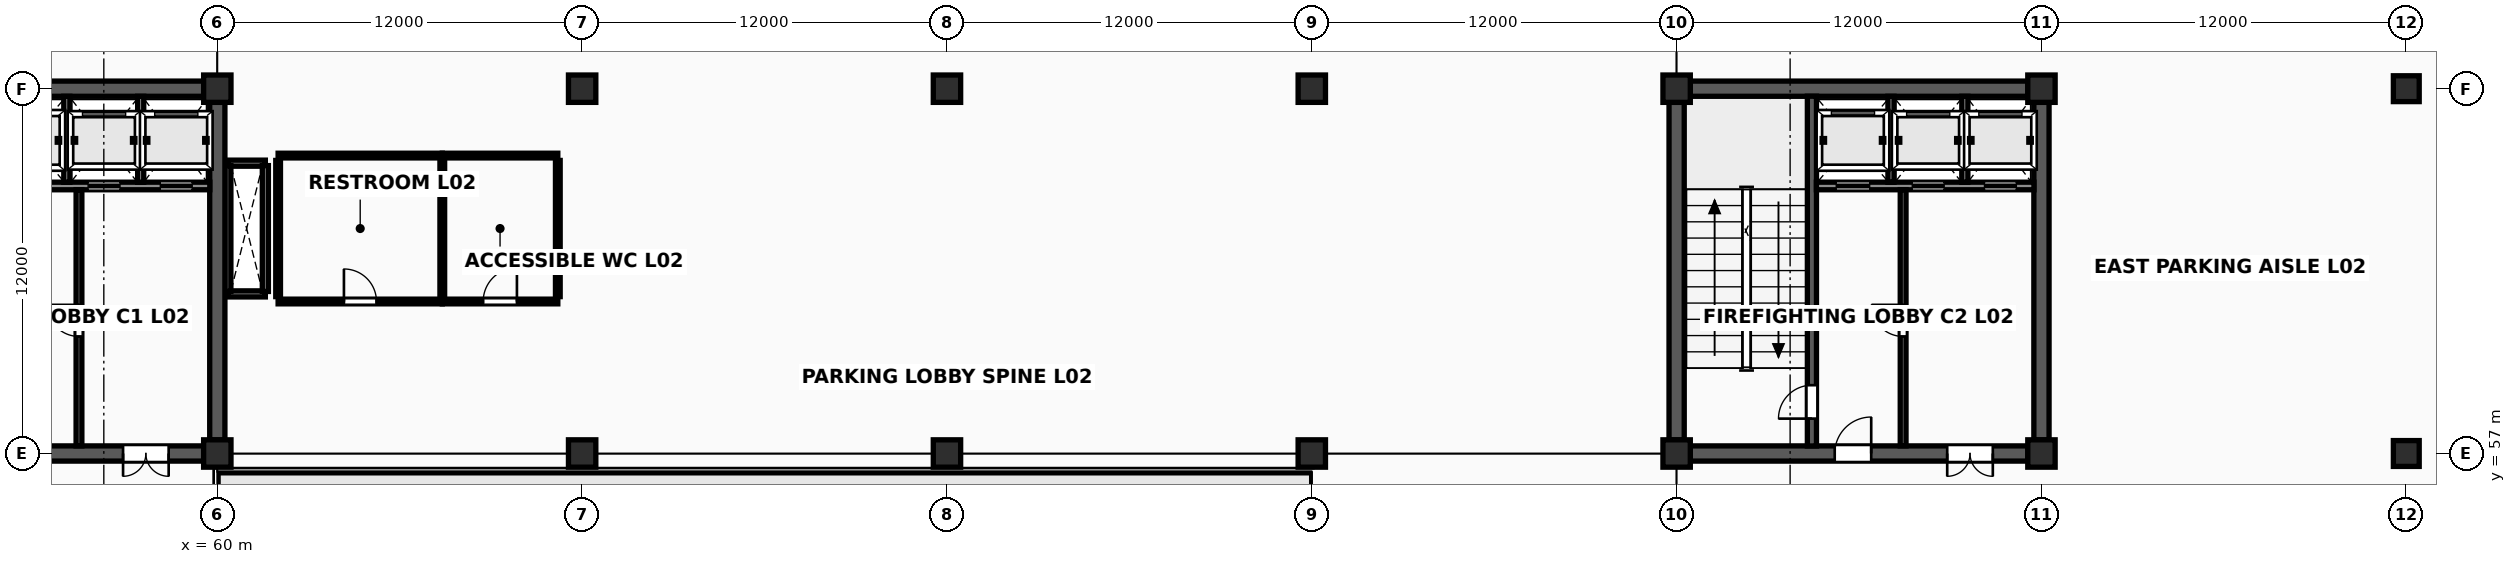
"""IFC4 building model, lengths in metres.
Left out: names, types, materials, properties, quantities, classifications, styles, units other than length and angle.
Written with IfcOpenShell. Run it as: python <this file> out.ifc"""

import sys

from ifc_helpers import new_model, si_unit, direction, frame, frame_2d, origin, origin_2d, place, context, subcontext, project, spatial, rectangle, extrude, element, fill, save


model = new_model("IFC4")
c1 = context("Model", 3, precision=1e-05, world=origin(), true_north=direction((0.0, 1.0)))
c2 = subcontext(c1, "Body", "Model", "MODEL_VIEW")
j1 = project(units=[si_unit("LENGTHUNIT", "METRE"), si_unit("PLANEANGLEUNIT", "RADIAN")], contexts=[c1])
p1 = place(None, origin())
s1 = spatial("IfcSite", under=j1, at=p1, CompositionType="ELEMENT")
p2 = place(p1, origin())
s2 = spatial("IfcBuilding", under=s1, at=p2, CompositionType="ELEMENT")
p3 = place(p2, frame((0.0, 0.0, 9.6)))
s3 = spatial("IfcBuildingStorey", under=s2, at=p3, CompositionType="ELEMENT", Elevation=9.6)
for number, where, z_axis, x_axis in (
    (1, (60.0, 57.0, 0.0), (0.0, 0.0, 1.0), (1.0, 0.0, 0.0)),
    (2, (60.0, 69.0, 0.0), (0.0, 0.0, 1.0), (1.0, 0.0, 0.0)),
    (3, (72.0, 57.0, 0.0), (0.0, 0.0, 1.0), (1.0, 0.0, 0.0)),
    (4, (72.0, 69.0, 0.0), (0.0, 0.0, 1.0), (1.0, 0.0, 0.0)),
    (5, (84.0, 57.0, 0.0), (0.0, 0.0, 1.0), (1.0, 0.0, 0.0)),
    (6, (84.0, 69.0, 0.0), (0.0, 0.0, 1.0), (1.0, 0.0, 0.0)),
    (7, (96.0, 57.0, 0.0), (0.0, 0.0, 1.0), (1.0, 0.0, 0.0)),
    (8, (96.0, 69.0, 0.0), (0.0, 0.0, 1.0), (1.0, 0.0, 0.0)),
    (9, (108.0, 57.0, 0.0), (0.0, 0.0, 1.0), (1.0, 0.0, 0.0)),
    (10, (108.0, 69.0, 0.0), (0.0, 0.0, 1.0), (1.0, 0.0, 0.0)),
    (11, (120.0, 57.0, 0.0), (0.0, 0.0, 1.0), (1.0, 0.0, 0.0)),
    (12, (120.0, 69.0, 0.0), (0.0, 0.0, 1.0), (1.0, 0.0, 0.0)),
):
    element("IfcColumn", number, at=place(p3, frame(where, z_axis=z_axis, x_axis=x_axis)), inside=s3, PredefinedType="COLUMN", context=c2, shape_type="SweptSolid", body=[
        extrude(rectangle(XDim=0.9, YDim=0.9, at=origin_2d()), origin(), (0.0, 0.0, 1.0), 3.8),
    ])
for number, where, z_axis, x_axis in (
    (13, (132.0, 57.0, 0.0), (0.0, 0.0, 1.0), (1.0, 0.0, 0.0)),
    (14, (132.0, 69.0, 0.0), (0.0, 0.0, 1.0), (1.0, 0.0, 0.0)),
):
    element("IfcColumn", number, at=place(p3, frame(where, z_axis=z_axis, x_axis=x_axis)), inside=s3, PredefinedType="COLUMN", context=c2, shape_type="SweptSolid", body=[
        extrude(rectangle(XDim=0.85, YDim=0.85, at=origin_2d()), origin(), (0.0, 0.0, 1.0), 3.8),
    ])
for number, where, z_axis, x_axis in (
    (15, (60.347, 62.25, 0.0), (0.0, 0.0, 1.0), (1.0, 0.0, 0.0)),
    (16, (60.347, 66.55, 0.0), (0.0, 0.0, 1.0), (1.0, 0.0, 0.0)),
):
    element("IfcWall", number, at=place(p3, frame(where, z_axis=z_axis, x_axis=x_axis)), inside=s3, PredefinedType="SOLIDWALL", context=c2, shape_type="SweptSolid", body=[
        extrude(rectangle(XDim=1.233, YDim=0.2, at=frame_2d((0.617, 0.0))), origin(), (0.0, 0.0, 1.0), 3.638),
    ])
for number, where, z_axis, x_axis in (
    (17, (60.347, 62.33, 0.0), (0.0, 0.0, 1.0), (0.0, 1.0, 0.0)),
    (18, (61.58, 62.33, 0.0), (0.0, 0.0, 1.0), (0.0, 1.0, 0.0)),
):
    element("IfcWall", number, at=place(p3, frame(where, z_axis=z_axis, x_axis=x_axis)), inside=s3, PredefinedType="SOLIDWALL", context=c2, shape_type="SweptSolid", body=[
        extrude(rectangle(XDim=4.14, YDim=0.2, at=frame_2d((2.07, 0.0))), origin(), (0.0, 0.0, 1.0), 3.638),
    ])
p4 = place(p3, frame((48.447, 57.0, 0.0), z_axis=(0.0, 0.0, 1.0), x_axis=(1.0, 0.0, 0.0)))
e19 = element("IfcWall", 19, at=p4, inside=s3, PredefinedType="SHEAR", context=c2, shape_type="SweptSolid", body=[
    extrude(rectangle(XDim=11.106, YDim=0.5, at=frame_2d((5.553, 0.0))), origin(), (0.0, 0.0, 1.0), 3.638),
])
p5 = place(p4, frame((4.753, 0.0, 0.0)))
e20 = element("IfcOpeningElement", 20, at=p5, cuts=e19, PredefinedType="OPENING", context=c2, shape_type="SweptSolid", body=[
    extrude(rectangle(XDim=1.2, YDim=2.2, at=frame_2d((0.6, 1.1))), frame((0.0, 0.265, 0.0), z_axis=(0.0, -1.0, 0.0), x_axis=(1.0, 0.0, 0.0)), (0.0, 0.0, 1.0), 0.53),
])
p6 = place(p4, frame((8.453, 0.0, 0.0)))
e21 = element("IfcOpeningElement", 21, at=p6, cuts=e19, PredefinedType="OPENING", context=c2, shape_type="SweptSolid", body=[
    extrude(rectangle(XDim=1.5, YDim=2.25, at=frame_2d((0.75, 1.125))), frame((0.0, 0.265, 0.0), z_axis=(0.0, -1.0, 0.0), x_axis=(1.0, 0.0, 0.0)), (0.0, 0.0, 1.0), 0.53),
])
for number, where, z_axis, x_axis in (
    (22, (48.447, 69.0, 0.0), (0.0, 0.0, 1.0), (1.0, 0.0, 0.0)),
    (23, (60.0, 57.447, 0.0), (0.0, 0.0, 1.0), (0.0, 1.0, 0.0)),
):
    element("IfcWall", number, at=place(p3, frame(where, z_axis=z_axis, x_axis=x_axis)), inside=s3, PredefinedType="SHEAR", context=c2, shape_type="SweptSolid", body=[
        extrude(rectangle(XDim=11.106, YDim=0.5, at=frame_2d((5.553, 0.0))), origin(), (0.0, 0.0, 1.0), 3.638),
    ])
p7 = place(p3, frame((52.597, 65.8, 0.0), z_axis=(0.0, 0.0, 1.0), x_axis=(1.0, 0.0, 0.0)))
e24 = element("IfcWall", 24, at=p7, inside=s3, PredefinedType="SOLIDWALL", context=c2, shape_type="SweptSolid", body=[
    extrude(rectangle(XDim=7.156, YDim=0.25, at=frame_2d((3.578, 0.0))), origin(), (0.0, 0.0, 1.0), 3.638),
])
p8 = place(p7, frame((0.653, 0.0, 0.0)))
e25 = element("IfcOpeningElement", 25, at=p8, cuts=e24, PredefinedType="OPENING", context=c2, shape_type="SweptSolid", body=[
    extrude(rectangle(XDim=1.1, YDim=2.24, at=frame_2d((0.55, 1.12))), frame((0.0, 0.14, 0.0), z_axis=(0.0, -1.0, 0.0), x_axis=(1.0, 0.0, 0.0)), (0.0, 0.0, 1.0), 0.28),
])
p9 = place(p7, frame((3.153, 0.0, 0.0)))
e26 = element("IfcOpeningElement", 26, at=p9, cuts=e24, PredefinedType="OPENING", context=c2, shape_type="SweptSolid", body=[
    extrude(rectangle(XDim=1.05, YDim=2.2, at=frame_2d((0.525, 1.1))), frame((0.0, 0.14, 0.0), z_axis=(0.0, -1.0, 0.0), x_axis=(1.0, 0.0, 0.0)), (0.0, 0.0, 1.0), 0.28),
])
p10 = place(p7, frame((5.528, 0.0, 0.0)))
e27 = element("IfcOpeningElement", 27, at=p10, cuts=e24, PredefinedType="OPENING", context=c2, shape_type="SweptSolid", body=[
    extrude(rectangle(XDim=1.05, YDim=2.2, at=frame_2d((0.525, 1.1))), frame((0.0, 0.14, 0.0), z_axis=(0.0, -1.0, 0.0), x_axis=(1.0, 0.0, 0.0)), (0.0, 0.0, 1.0), 0.28),
])
for number, where, z_axis, x_axis in (
    (28, (55.05, 65.92, 0.0), (0.0, 0.0, 1.0), (0.0, 1.0, 0.0)),
    (29, (57.48, 65.92, 0.0), (0.0, 0.0, 1.0), (0.0, 1.0, 0.0)),
):
    element("IfcWall", number, at=place(p3, frame(where, z_axis=z_axis, x_axis=x_axis)), inside=s3, PredefinedType="SOLIDWALL", context=c2, shape_type="SweptSolid", body=[
        extrude(rectangle(XDim=2.83, YDim=0.2, at=frame_2d((1.415, 0.0))), origin(), (0.0, 0.0, 1.0), 3.628),
    ])
p11 = place(p3, frame((55.45, 57.25, 0.0), z_axis=(0.0, 0.0, 1.0), x_axis=(0.0, 1.0, 0.0)))
e30 = element("IfcWall", 30, at=p11, inside=s3, PredefinedType="SOLIDWALL", context=c2, shape_type="SweptSolid", body=[
    extrude(rectangle(XDim=8.43, YDim=0.19, at=frame_2d((4.215, 0.0))), origin(), (0.0, 0.0, 1.0), 3.628),
])
p12 = place(p11, frame((3.6, 0.0, 0.0)))
e31 = element("IfcOpeningElement", 31, at=p12, cuts=e30, PredefinedType="OPENING", context=c2, shape_type="SweptSolid", body=[
    extrude(rectangle(XDim=1.04, YDim=2.18, at=frame_2d((0.52, 1.09))), frame((0.0, 0.11, 0.0), z_axis=(0.0, -1.0, 0.0), x_axis=(1.0, 0.0, 0.0)), (0.0, 0.0, 1.0), 0.22),
])
p13 = place(p3, frame((108.447, 57.0, 0.0), z_axis=(0.0, 0.0, 1.0), x_axis=(1.0, 0.0, 0.0)))
e32 = element("IfcWall", 32, at=p13, inside=s3, PredefinedType="SHEAR", context=c2, shape_type="SweptSolid", body=[
    extrude(rectangle(XDim=11.106, YDim=0.5, at=frame_2d((5.553, 0.0))), origin(), (0.0, 0.0, 1.0), 3.638),
])
p14 = place(p13, frame((4.753, 0.0, 0.0)))
e33 = element("IfcOpeningElement", 33, at=p14, cuts=e32, PredefinedType="OPENING", context=c2, shape_type="SweptSolid", body=[
    extrude(rectangle(XDim=1.2, YDim=2.2, at=frame_2d((0.6, 1.1))), frame((0.0, 0.265, 0.0), z_axis=(0.0, -1.0, 0.0), x_axis=(1.0, 0.0, 0.0)), (0.0, 0.0, 1.0), 0.53),
])
p15 = place(p13, frame((8.453, 0.0, 0.0)))
e34 = element("IfcOpeningElement", 34, at=p15, cuts=e32, PredefinedType="OPENING", context=c2, shape_type="SweptSolid", body=[
    extrude(rectangle(XDim=1.5, YDim=2.25, at=frame_2d((0.75, 1.125))), frame((0.0, 0.265, 0.0), z_axis=(0.0, -1.0, 0.0), x_axis=(1.0, 0.0, 0.0)), (0.0, 0.0, 1.0), 0.53),
])
for number, where, z_axis, x_axis in (
    (35, (108.447, 69.0, 0.0), (0.0, 0.0, 1.0), (1.0, 0.0, 0.0)),
    (36, (108.0, 57.447, 0.0), (0.0, 0.0, 1.0), (0.0, 1.0, 0.0)),
    (37, (120.0, 57.447, 0.0), (0.0, 0.0, 1.0), (0.0, 1.0, 0.0)),
):
    element("IfcWall", number, at=place(p3, frame(where, z_axis=z_axis, x_axis=x_axis)), inside=s3, PredefinedType="SHEAR", context=c2, shape_type="SweptSolid", body=[
        extrude(rectangle(XDim=11.106, YDim=0.5, at=frame_2d((5.553, 0.0))), origin(), (0.0, 0.0, 1.0), 3.638),
    ])
p16 = place(p3, frame((112.45, 57.247, 0.0), z_axis=(0.0, 0.0, 1.0), x_axis=(0.0, 1.0, 0.0)))
e38 = element("IfcWall", 38, at=p16, inside=s3, PredefinedType="SHEAR", context=c2, shape_type="SweptSolid", body=[
    extrude(rectangle(XDim=11.506, YDim=0.3, at=frame_2d((5.753, 0.0))), origin(), (0.0, 0.0, 1.0), 3.638),
])
p17 = place(p16, frame((0.9, 0.0, 0.0)))
e39 = element("IfcOpeningElement", 39, at=p17, cuts=e38, PredefinedType="OPENING", context=c2, shape_type="SweptSolid", body=[
    extrude(rectangle(XDim=1.1, YDim=2.2, at=frame_2d((0.55, 1.1))), frame((0.0, 0.165, 0.0), z_axis=(0.0, -1.0, 0.0), x_axis=(1.0, 0.0, 0.0)), (0.0, 0.0, 1.0), 0.33),
])
p18 = place(p3, frame((112.597, 65.8, 0.0), z_axis=(0.0, 0.0, 1.0), x_axis=(1.0, 0.0, 0.0)))
e40 = element("IfcWall", 40, at=p18, inside=s3, PredefinedType="SOLIDWALL", context=c2, shape_type="SweptSolid", body=[
    extrude(rectangle(XDim=7.156, YDim=0.25, at=frame_2d((3.578, 0.0))), origin(), (0.0, 0.0, 1.0), 3.638),
])
p19 = place(p18, frame((0.653, 0.0, 0.0)))
e41 = element("IfcOpeningElement", 41, at=p19, cuts=e40, PredefinedType="OPENING", context=c2, shape_type="SweptSolid", body=[
    extrude(rectangle(XDim=1.1, YDim=2.24, at=frame_2d((0.55, 1.12))), frame((0.0, 0.14, 0.0), z_axis=(0.0, -1.0, 0.0), x_axis=(1.0, 0.0, 0.0)), (0.0, 0.0, 1.0), 0.28),
])
p20 = place(p18, frame((3.153, 0.0, 0.0)))
e42 = element("IfcOpeningElement", 42, at=p20, cuts=e40, PredefinedType="OPENING", context=c2, shape_type="SweptSolid", body=[
    extrude(rectangle(XDim=1.05, YDim=2.2, at=frame_2d((0.525, 1.1))), frame((0.0, 0.14, 0.0), z_axis=(0.0, -1.0, 0.0), x_axis=(1.0, 0.0, 0.0)), (0.0, 0.0, 1.0), 0.28),
])
p21 = place(p18, frame((5.528, 0.0, 0.0)))
e43 = element("IfcOpeningElement", 43, at=p21, cuts=e40, PredefinedType="OPENING", context=c2, shape_type="SweptSolid", body=[
    extrude(rectangle(XDim=1.05, YDim=2.2, at=frame_2d((0.525, 1.1))), frame((0.0, 0.14, 0.0), z_axis=(0.0, -1.0, 0.0), x_axis=(1.0, 0.0, 0.0)), (0.0, 0.0, 1.0), 0.28),
])
for number, where, z_axis, x_axis in (
    (44, (115.05, 65.92, 0.0), (0.0, 0.0, 1.0), (0.0, 1.0, 0.0)),
    (45, (117.48, 65.92, 0.0), (0.0, 0.0, 1.0), (0.0, 1.0, 0.0)),
):
    element("IfcWall", number, at=place(p3, frame(where, z_axis=z_axis, x_axis=x_axis)), inside=s3, PredefinedType="SOLIDWALL", context=c2, shape_type="SweptSolid", body=[
        extrude(rectangle(XDim=2.83, YDim=0.2, at=frame_2d((1.415, 0.0))), origin(), (0.0, 0.0, 1.0), 3.628),
    ])
p22 = place(p3, frame((115.45, 57.25, 0.0), z_axis=(0.0, 0.0, 1.0), x_axis=(0.0, 1.0, 0.0)))
e46 = element("IfcWall", 46, at=p22, inside=s3, PredefinedType="SOLIDWALL", context=c2, shape_type="SweptSolid", body=[
    extrude(rectangle(XDim=8.43, YDim=0.19, at=frame_2d((4.215, 0.0))), origin(), (0.0, 0.0, 1.0), 3.628),
])
p23 = place(p22, frame((3.6, 0.0, 0.0)))
e47 = element("IfcOpeningElement", 47, at=p23, cuts=e46, PredefinedType="OPENING", context=c2, shape_type="SweptSolid", body=[
    extrude(rectangle(XDim=1.04, YDim=2.18, at=frame_2d((0.52, 1.09))), frame((0.0, 0.11, 0.0), z_axis=(0.0, -1.0, 0.0), x_axis=(1.0, 0.0, 0.0)), (0.0, 0.0, 1.0), 0.22),
])
p24 = place(p3, frame((62.0, 62.0, 0.0), z_axis=(0.0, 0.0, 1.0), x_axis=(1.0, 0.0, 0.0)))
e48 = element("IfcWall", 48, at=p24, inside=s3, PredefinedType="PLUMBINGWALL", context=c2, shape_type="SweptSolid", body=[
    extrude(rectangle(XDim=5.4, YDim=0.155, at=frame_2d((2.7, 0.0))), origin(), (0.0, 0.0, 1.0), 2.75),
])
p25 = place(p24, frame((2.165, 0.0, 0.0)))
e49 = element("IfcOpeningElement", 49, at=p25, cuts=e48, PredefinedType="OPENING", context=c2, shape_type="SweptSolid", body=[
    extrude(rectangle(XDim=1.07, YDim=2.19, at=frame_2d((0.535, 1.095))), frame((0.0, 0.093, 0.0), z_axis=(0.0, -1.0, 0.0), x_axis=(1.0, 0.0, 0.0)), (0.0, 0.0, 1.0), 0.185),
])
p26 = place(p3, frame((62.0, 66.8, 0.0), z_axis=(0.0, 0.0, 1.0), x_axis=(1.0, 0.0, 0.0)))
e50 = element("IfcWall", 50, at=p26, inside=s3, PredefinedType="PLUMBINGWALL", context=c2, shape_type="SweptSolid", body=[
    extrude(rectangle(XDim=5.4, YDim=0.155, at=frame_2d((2.7, 0.0))), origin(), (0.0, 0.0, 1.0), 2.75),
])
for number, where, z_axis, x_axis in (
    (51, (62.0, 62.16, 0.0), (0.0, 0.0, 1.0), (0.0, 1.0, 0.0)),
    (52, (67.4, 62.16, 0.0), (0.0, 0.0, 1.0), (0.0, 1.0, 0.0)),
):
    element("IfcWall", number, at=place(p3, frame(where, z_axis=z_axis, x_axis=x_axis)), inside=s3, PredefinedType="PLUMBINGWALL", context=c2, shape_type="SweptSolid", body=[
        extrude(rectangle(XDim=4.48, YDim=0.155, at=frame_2d((2.24, 0.0))), origin(), (0.0, 0.0, 1.0), 2.75),
    ])
p27 = place(p3, frame((67.4, 62.0, 0.0), z_axis=(0.0, 0.0, 1.0), x_axis=(1.0, 0.0, 0.0)))
e53 = element("IfcWall", 53, at=p27, inside=s3, PredefinedType="PLUMBINGWALL", context=c2, shape_type="SweptSolid", body=[
    extrude(rectangle(XDim=3.8, YDim=0.155, at=frame_2d((1.9, 0.0))), origin(), (0.0, 0.0, 1.0), 2.75),
])
p28 = place(p27, frame((1.345, 0.0, 0.0)))
e54 = element("IfcOpeningElement", 54, at=p28, cuts=e53, PredefinedType="OPENING", context=c2, shape_type="SweptSolid", body=[
    extrude(rectangle(XDim=1.11, YDim=2.21, at=frame_2d((0.555, 1.105))), frame((0.0, 0.093, 0.0), z_axis=(0.0, -1.0, 0.0), x_axis=(1.0, 0.0, 0.0)), (0.0, 0.0, 1.0), 0.185),
])
p29 = place(p3, frame((67.4, 66.8, 0.0), z_axis=(0.0, 0.0, 1.0), x_axis=(1.0, 0.0, 0.0)))
e55 = element("IfcWall", 55, at=p29, inside=s3, PredefinedType="PLUMBINGWALL", context=c2, shape_type="SweptSolid", body=[
    extrude(rectangle(XDim=3.8, YDim=0.155, at=frame_2d((1.9, 0.0))), origin(), (0.0, 0.0, 1.0), 2.75),
])
p30 = place(p3, frame((71.2, 62.16, 0.0), z_axis=(0.0, 0.0, 1.0), x_axis=(0.0, 1.0, 0.0)))
e56 = element("IfcWall", 56, at=p30, inside=s3, PredefinedType="PLUMBINGWALL", context=c2, shape_type="SweptSolid", body=[
    extrude(rectangle(XDim=4.48, YDim=0.155, at=frame_2d((2.24, 0.0))), origin(), (0.0, 0.0, 1.0), 2.75),
])
p31 = place(p12, origin())
e57 = element("IfcDoor", 57, at=p31, inside=s3, OperationType="SINGLE_SWING_RIGHT", PredefinedType="DOOR", context=c2, shape_type="SweptSolid", body=[
    extrude(rectangle(XDim=1.04, YDim=2.18, at=frame_2d((0.52, 1.09))), frame((0.0, 0.025, 0.0), z_axis=(0.0, -1.0, 0.0), x_axis=(1.0, 0.0, 0.0)), (0.0, 0.0, 1.0), 0.05),
])
fill(e31, e57)
p32 = place(p6, origin())
e58 = element("IfcDoor", 58, at=p32, inside=s3, OperationType="DOUBLE_DOOR_SINGLE_SWING", PredefinedType="DOOR", context=c2, shape_type="SweptSolid", body=[
    extrude(rectangle(XDim=1.5, YDim=2.25, at=frame_2d((0.75, 1.125))), frame((0.0, 0.025, 0.0), z_axis=(0.0, -1.0, 0.0), x_axis=(1.0, 0.0, 0.0)), (0.0, 0.0, 1.0), 0.05),
])
fill(e21, e58)
p33 = place(p9, origin())
e59 = element("IfcDoor", 59, at=p33, inside=s3, OperationType="SLIDING_TO_LEFT", PredefinedType="USERDEFINED", context=c2, shape_type="SweptSolid", body=[
    extrude(rectangle(XDim=1.05, YDim=2.2, at=frame_2d((0.525, 1.1))), frame((0.0, 0.025, 0.0), z_axis=(0.0, -1.0, 0.0), x_axis=(1.0, 0.0, 0.0)), (0.0, 0.0, 1.0), 0.05),
])
fill(e26, e59)
p34 = place(p10, origin())
e60 = element("IfcDoor", 60, at=p34, inside=s3, OperationType="SLIDING_TO_LEFT", PredefinedType="USERDEFINED", context=c2, shape_type="SweptSolid", body=[
    extrude(rectangle(XDim=1.05, YDim=2.2, at=frame_2d((0.525, 1.1))), frame((0.0, 0.025, 0.0), z_axis=(0.0, -1.0, 0.0), x_axis=(1.0, 0.0, 0.0)), (0.0, 0.0, 1.0), 0.05),
])
fill(e27, e60)
p35 = place(p17, origin())
e61 = element("IfcDoor", 61, at=p35, inside=s3, OperationType="SINGLE_SWING_LEFT", PredefinedType="DOOR", context=c2, shape_type="SweptSolid", body=[
    extrude(rectangle(XDim=1.1, YDim=2.2, at=frame_2d((0.55, 1.1))), frame((0.0, 0.025, 0.0), z_axis=(0.0, -1.0, 0.0), x_axis=(1.0, 0.0, 0.0)), (0.0, 0.0, 1.0), 0.05),
])
fill(e39, e61)
p36 = place(p23, origin())
e62 = element("IfcDoor", 62, at=p36, inside=s3, OperationType="SINGLE_SWING_RIGHT", PredefinedType="DOOR", context=c2, shape_type="SweptSolid", body=[
    extrude(rectangle(XDim=1.04, YDim=2.18, at=frame_2d((0.52, 1.09))), frame((0.0, 0.025, 0.0), z_axis=(0.0, -1.0, 0.0), x_axis=(1.0, 0.0, 0.0)), (0.0, 0.0, 1.0), 0.05),
])
fill(e47, e62)
p37 = place(p14, origin())
e63 = element("IfcDoor", 63, at=p37, inside=s3, OperationType="SINGLE_SWING_RIGHT", PredefinedType="DOOR", context=c2, shape_type="SweptSolid", body=[
    extrude(rectangle(XDim=1.2, YDim=2.2, at=frame_2d((0.6, 1.1))), frame((0.0, 0.025, 0.0), z_axis=(0.0, -1.0, 0.0), x_axis=(1.0, 0.0, 0.0)), (0.0, 0.0, 1.0), 0.05),
])
fill(e33, e63)
p38 = place(p15, origin())
e64 = element("IfcDoor", 64, at=p38, inside=s3, OperationType="DOUBLE_DOOR_SINGLE_SWING", PredefinedType="DOOR", context=c2, shape_type="SweptSolid", body=[
    extrude(rectangle(XDim=1.5, YDim=2.25, at=frame_2d((0.75, 1.125))), frame((0.0, 0.025, 0.0), z_axis=(0.0, -1.0, 0.0), x_axis=(1.0, 0.0, 0.0)), (0.0, 0.0, 1.0), 0.05),
])
fill(e34, e64)
p39 = place(p19, origin())
e65 = element("IfcDoor", 65, at=p39, inside=s3, OperationType="SLIDING_TO_LEFT", PredefinedType="USERDEFINED", context=c2, shape_type="SweptSolid", body=[
    extrude(rectangle(XDim=1.1, YDim=2.24, at=frame_2d((0.55, 1.12))), frame((0.0, 0.025, 0.0), z_axis=(0.0, -1.0, 0.0), x_axis=(1.0, 0.0, 0.0)), (0.0, 0.0, 1.0), 0.05),
])
fill(e41, e65)
p40 = place(p20, origin())
e66 = element("IfcDoor", 66, at=p40, inside=s3, OperationType="SLIDING_TO_LEFT", PredefinedType="USERDEFINED", context=c2, shape_type="SweptSolid", body=[
    extrude(rectangle(XDim=1.05, YDim=2.2, at=frame_2d((0.525, 1.1))), frame((0.0, 0.025, 0.0), z_axis=(0.0, -1.0, 0.0), x_axis=(1.0, 0.0, 0.0)), (0.0, 0.0, 1.0), 0.05),
])
fill(e42, e66)
p41 = place(p21, origin())
e67 = element("IfcDoor", 67, at=p41, inside=s3, OperationType="SLIDING_TO_LEFT", PredefinedType="USERDEFINED", context=c2, shape_type="SweptSolid", body=[
    extrude(rectangle(XDim=1.05, YDim=2.2, at=frame_2d((0.525, 1.1))), frame((0.0, 0.025, 0.0), z_axis=(0.0, -1.0, 0.0), x_axis=(1.0, 0.0, 0.0)), (0.0, 0.0, 1.0), 0.05),
])
fill(e43, e67)
p42 = place(p25, origin())
e68 = element("IfcDoor", 68, at=p42, inside=s3, OperationType="SINGLE_SWING_LEFT", PredefinedType="DOOR", context=c2, shape_type="SweptSolid", body=[
    extrude(rectangle(XDim=1.07, YDim=2.19, at=frame_2d((0.535, 1.095))), frame((0.0, 0.025, 0.0), z_axis=(0.0, -1.0, 0.0), x_axis=(1.0, 0.0, 0.0)), (0.0, 0.0, 1.0), 0.05),
])
fill(e49, e68)
p43 = place(p28, origin())
e69 = element("IfcDoor", 69, at=p43, inside=s3, OperationType="SINGLE_SWING_RIGHT", PredefinedType="DOOR", context=c2, shape_type="SweptSolid", body=[
    extrude(rectangle(XDim=1.11, YDim=2.21, at=frame_2d((0.555, 1.105))), frame((0.0, 0.025, 0.0), z_axis=(0.0, -1.0, 0.0), x_axis=(1.0, 0.0, 0.0)), (0.0, 0.0, 1.0), 0.05),
])
fill(e54, e69)
save(model, sys.argv[1])
